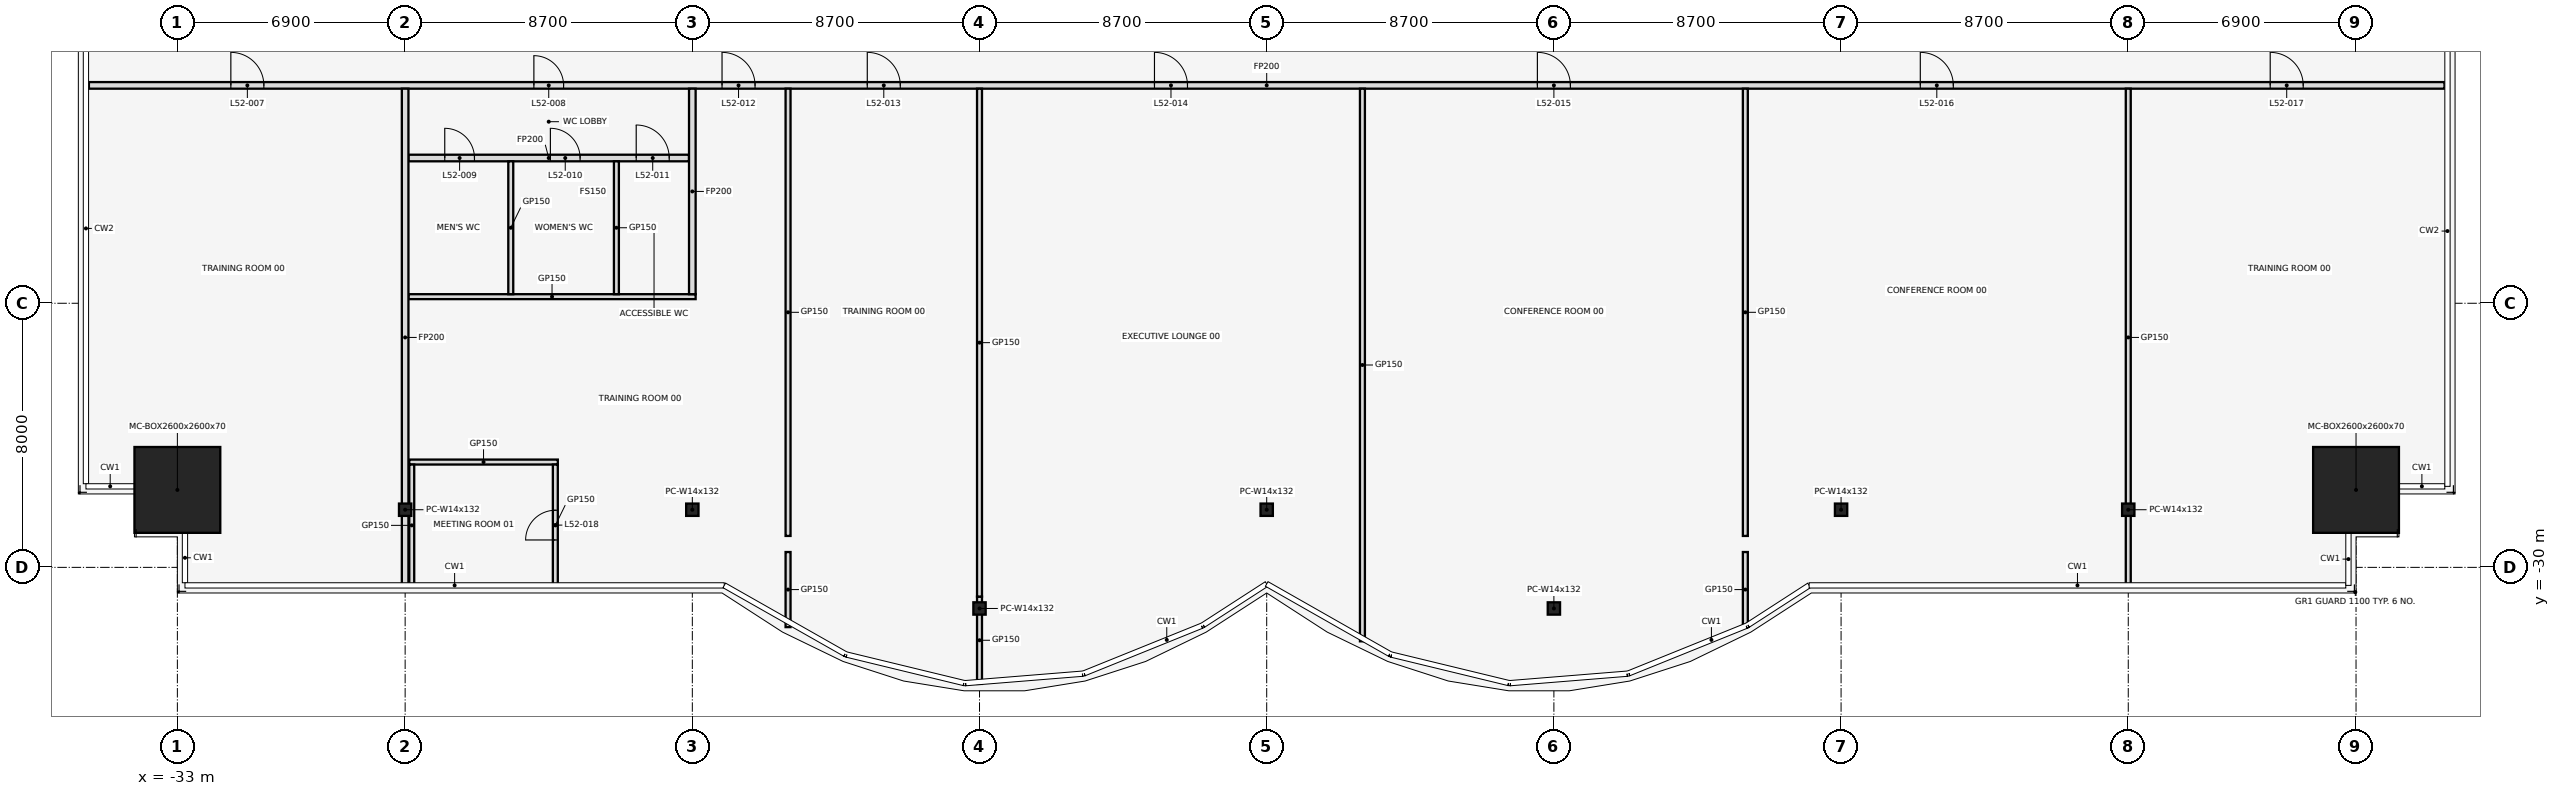
"""IFC4 building model, lengths in metres.
Left out: names, types, materials, properties, quantities, classifications, styles, units other than length and angle.
Written with IfcOpenShell. Run it as: python <this file> out.ifc"""

import sys

from ifc_helpers import new_model, si_unit, direction, frame, frame_2d, origin, origin_2d, place, context, subcontext, project, spatial, rectangle, hollow_rectangle, i_section, extrude, element, fill, save


model = new_model("IFC4")
c1 = context("Model", 3, precision=1e-05, world=origin(), true_north=direction((0.0, 1.0)))
c2 = subcontext(c1, "Body", "Model", "MODEL_VIEW")
j1 = project(units=[si_unit("LENGTHUNIT", "METRE"), si_unit("PLANEANGLEUNIT", "RADIAN")], contexts=[c1])
p1 = place(None, origin())
s1 = spatial("IfcSite", under=j1, at=p1, CompositionType="ELEMENT")
p2 = place(p1, origin())
s2 = spatial("IfcBuilding", under=s1, at=p2, CompositionType="ELEMENT")
p3 = place(p2, frame((0.0, 0.0, 231.9)))
s3 = spatial("IfcBuildingStorey", under=s2, at=p3, CompositionType="ELEMENT", Elevation=231.9)
p4 = place(p3, frame((-33.0, -27.654, 0.0), z_axis=(0.0, 0.0, 1.0), x_axis=(1.0, 0.0, 0.0)))
e1 = element("IfcColumn", 1, at=p4, inside=s3, PredefinedType="COLUMN", context=c2, shape_type="SweptSolid", body=[
    extrude(hollow_rectangle(XDim=2.6, YDim=2.6, WallThickness=0.07, at=origin_2d()), origin(), (0.0, 0.0, 1.0), 4.1),
])
for number, where, z_axis, x_axis in (
    (2, (-26.1, -28.254, 0.0), (0.0, 0.0, 1.0), (1.0, 0.0, 0.0)),
    (3, (-17.4, -28.254, 0.0), (0.0, 0.0, 1.0), (1.0, 0.0, 0.0)),
    (4, (-8.7, -31.245, 0.0), (0.0, 0.0, 1.0), (1.0, 0.0, 0.0)),
    (5, (0.0, -28.254, 0.0), (0.0, 0.0, 1.0), (1.0, 0.0, 0.0)),
    (6, (8.7, -31.245, 0.0), (0.0, 0.0, 1.0), (1.0, 0.0, 0.0)),
    (7, (17.4, -28.254, 0.0), (0.0, 0.0, 1.0), (1.0, 0.0, 0.0)),
    (8, (26.1, -28.254, 0.0), (0.0, 0.0, 1.0), (1.0, 0.0, 0.0)),
):
    element("IfcColumn", number, at=place(p3, frame(where, z_axis=z_axis, x_axis=x_axis)), inside=s3, PredefinedType="COLUMN", context=c2, shape_type="SweptSolid", body=[
        extrude(i_section(OverallWidth=0.373, OverallDepth=0.373, WebThickness=0.016, FlangeThickness=0.026, at=origin_2d()), origin(), (0.0, 0.0, 1.0), 4.1),
    ])
p5 = place(p3, frame((33.0, -27.654, 0.0), z_axis=(0.0, 0.0, 1.0), x_axis=(1.0, 0.0, 0.0)))
e9 = element("IfcColumn", 9, at=p5, inside=s3, PredefinedType="COLUMN", context=c2, shape_type="SweptSolid", body=[
    extrude(hollow_rectangle(XDim=2.6, YDim=2.6, WallThickness=0.07, at=origin_2d()), origin(), (0.0, 0.0, 1.0), 4.1),
])
p6 = place(p3, frame((-25.975, -26.81, 0.0), z_axis=(0.0, 0.0, 1.0), x_axis=(1.0, 0.0, 0.0)))
e10 = element("IfcWall", 10, at=p6, inside=s3, PredefinedType="PARTITIONING", context=c2, shape_type="SweptSolid", body=[
    extrude(rectangle(XDim=4.5, YDim=0.15, at=frame_2d((2.25, 0.0))), origin(), (0.0, 0.0, 1.0), 2.79),
])
p7 = place(p3, frame((-26.0, -21.8, 0.0), z_axis=(0.0, 0.0, 1.0), x_axis=(1.0, 0.0, 0.0)))
e11 = element("IfcWall", 11, at=p7, inside=s3, PredefinedType="PARTITIONING", context=c2, shape_type="SweptSolid", body=[
    extrude(rectangle(XDim=8.7, YDim=0.15, at=frame_2d((4.35, 0.0))), origin(), (0.0, 0.0, 1.0), 2.79),
])
p8 = place(p3, frame((-26.0, -17.6, 0.0), z_axis=(0.0, 0.0, 1.0), x_axis=(1.0, 0.0, 0.0)))
e12 = element("IfcWall", 12, at=p8, inside=s3, PredefinedType="PARTITIONING", context=c2, shape_type="SweptSolid", body=[
    extrude(rectangle(XDim=8.5, YDim=0.2, at=frame_2d((4.25, 0.0))), origin(), (0.0, 0.0, 1.0), 2.79),
])
p9 = place(p8, frame((1.1, 0.0, 0.0)))
e13 = element("IfcOpeningElement", 13, at=p9, cuts=e12, PredefinedType="OPENING", context=c2, shape_type="SweptSolid", body=[
    extrude(rectangle(XDim=0.9, YDim=2.1, at=frame_2d((0.45, 1.05))), frame((0.0, 0.112, 0.0), z_axis=(0.0, -1.0, 0.0), x_axis=(1.0, 0.0, 0.0)), (0.0, 0.0, 1.0), 0.224),
])
p10 = place(p8, frame((4.3, 0.0, 0.0)))
e14 = element("IfcOpeningElement", 14, at=p10, cuts=e12, PredefinedType="OPENING", context=c2, shape_type="SweptSolid", body=[
    extrude(rectangle(XDim=0.9, YDim=2.1, at=frame_2d((0.45, 1.05))), frame((0.0, 0.112, 0.0), z_axis=(0.0, -1.0, 0.0), x_axis=(1.0, 0.0, 0.0)), (0.0, 0.0, 1.0), 0.224),
])
p11 = place(p8, frame((6.9, 0.0, 0.0)))
e15 = element("IfcOpeningElement", 15, at=p11, cuts=e12, PredefinedType="OPENING", context=c2, shape_type="SweptSolid", body=[
    extrude(rectangle(XDim=1.0, YDim=2.1, at=frame_2d((0.5, 1.05))), frame((0.0, 0.112, 0.0), z_axis=(0.0, -1.0, 0.0), x_axis=(1.0, 0.0, 0.0)), (0.0, 0.0, 1.0), 0.224),
])
p12 = place(p3, frame((-35.68, -15.4, 0.0), z_axis=(0.0, 0.0, 1.0), x_axis=(1.0, 0.0, 0.0)))
e16 = element("IfcWall", 16, at=p12, inside=s3, PredefinedType="PARTITIONING", context=c2, shape_type="SweptSolid", body=[
    extrude(rectangle(XDim=71.36, YDim=0.2, at=frame_2d((35.68, 0.0))), origin(), (0.0, 0.0, 1.0), 2.79),
])
p13 = place(p12, frame((4.3, 0.0, 0.0)))
e17 = element("IfcOpeningElement", 17, at=p13, cuts=e16, PredefinedType="OPENING", context=c2, shape_type="SweptSolid", body=[
    extrude(rectangle(XDim=1.0, YDim=2.1, at=frame_2d((0.5, 1.05))), frame((0.0, 0.112, 0.0), z_axis=(0.0, -1.0, 0.0), x_axis=(1.0, 0.0, 0.0)), (0.0, 0.0, 1.0), 0.224),
])
p14 = place(p12, frame((13.48, 0.0, 0.0)))
e18 = element("IfcOpeningElement", 18, at=p14, cuts=e16, PredefinedType="OPENING", context=c2, shape_type="SweptSolid", body=[
    extrude(rectangle(XDim=0.9, YDim=2.1, at=frame_2d((0.45, 1.05))), frame((0.0, 0.112, 0.0), z_axis=(0.0, -1.0, 0.0), x_axis=(1.0, 0.0, 0.0)), (0.0, 0.0, 1.0), 0.224),
])
p15 = place(p12, frame((19.18, 0.0, 0.0)))
e19 = element("IfcOpeningElement", 19, at=p15, cuts=e16, PredefinedType="OPENING", context=c2, shape_type="SweptSolid", body=[
    extrude(rectangle(XDim=1.0, YDim=2.1, at=frame_2d((0.5, 1.05))), frame((0.0, 0.112, 0.0), z_axis=(0.0, -1.0, 0.0), x_axis=(1.0, 0.0, 0.0)), (0.0, 0.0, 1.0), 0.224),
])
p16 = place(p12, frame((23.58, 0.0, 0.0)))
e20 = element("IfcOpeningElement", 20, at=p16, cuts=e16, PredefinedType="OPENING", context=c2, shape_type="SweptSolid", body=[
    extrude(rectangle(XDim=1.0, YDim=2.1, at=frame_2d((0.5, 1.05))), frame((0.0, 0.112, 0.0), z_axis=(0.0, -1.0, 0.0), x_axis=(1.0, 0.0, 0.0)), (0.0, 0.0, 1.0), 0.224),
])
p17 = place(p12, frame((32.28, 0.0, 0.0)))
e21 = element("IfcOpeningElement", 21, at=p17, cuts=e16, PredefinedType="OPENING", context=c2, shape_type="SweptSolid", body=[
    extrude(rectangle(XDim=1.0, YDim=2.1, at=frame_2d((0.5, 1.05))), frame((0.0, 0.112, 0.0), z_axis=(0.0, -1.0, 0.0), x_axis=(1.0, 0.0, 0.0)), (0.0, 0.0, 1.0), 0.224),
])
p18 = place(p12, frame((43.88, 0.0, 0.0)))
e22 = element("IfcOpeningElement", 22, at=p18, cuts=e16, PredefinedType="OPENING", context=c2, shape_type="SweptSolid", body=[
    extrude(rectangle(XDim=1.0, YDim=2.1, at=frame_2d((0.5, 1.05))), frame((0.0, 0.112, 0.0), z_axis=(0.0, -1.0, 0.0), x_axis=(1.0, 0.0, 0.0)), (0.0, 0.0, 1.0), 0.224),
])
p19 = place(p12, frame((55.48, 0.0, 0.0)))
e23 = element("IfcOpeningElement", 23, at=p19, cuts=e16, PredefinedType="OPENING", context=c2, shape_type="SweptSolid", body=[
    extrude(rectangle(XDim=1.0, YDim=2.1, at=frame_2d((0.5, 1.05))), frame((0.0, 0.112, 0.0), z_axis=(0.0, -1.0, 0.0), x_axis=(1.0, 0.0, 0.0)), (0.0, 0.0, 1.0), 0.224),
])
p20 = place(p12, frame((66.08, 0.0, 0.0)))
e24 = element("IfcOpeningElement", 24, at=p20, cuts=e16, PredefinedType="OPENING", context=c2, shape_type="SweptSolid", body=[
    extrude(rectangle(XDim=1.0, YDim=2.1, at=frame_2d((0.5, 1.05))), frame((0.0, 0.112, 0.0), z_axis=(0.0, -1.0, 0.0), x_axis=(1.0, 0.0, 0.0)), (0.0, 0.0, 1.0), 0.224),
])
p21 = place(p3, frame((-26.1, -30.57, 0.0), z_axis=(0.0, 0.0, 1.0), x_axis=(0.0, 1.0, 0.0)))
e25 = element("IfcWall", 25, at=p21, inside=s3, PredefinedType="PARTITIONING", context=c2, shape_type="SweptSolid", body=[
    extrude(rectangle(XDim=15.07, YDim=0.2, at=frame_2d((7.535, 0.0))), origin(), (0.0, 0.0, 1.0), 2.79),
])
p22 = place(p3, frame((-25.9, -30.57, 0.0), z_axis=(0.0, 0.0, 1.0), x_axis=(0.0, 1.0, 0.0)))
e26 = element("IfcWall", 26, at=p22, inside=s3, PredefinedType="PARTITIONING", context=c2, shape_type="SweptSolid", body=[
    extrude(rectangle(XDim=3.685, YDim=0.15, at=frame_2d((1.843, 0.0))), origin(), (0.0, 0.0, 1.0), 2.79),
])
p23 = place(p3, frame((-22.9, -21.725, 0.0), z_axis=(0.0, 0.0, 1.0), x_axis=(0.0, 1.0, 0.0)))
e27 = element("IfcWall", 27, at=p23, inside=s3, PredefinedType="PARTITIONING", context=c2, shape_type="SweptSolid", body=[
    extrude(rectangle(XDim=4.025, YDim=0.15, at=frame_2d((2.013, 0.0))), origin(), (0.0, 0.0, 1.0), 2.79),
])
p24 = place(p3, frame((-21.55, -30.57, 0.0), z_axis=(0.0, 0.0, 1.0), x_axis=(0.0, 1.0, 0.0)))
e28 = element("IfcWall", 28, at=p24, inside=s3, PredefinedType="PARTITIONING", context=c2, shape_type="SweptSolid", body=[
    extrude(rectangle(XDim=3.685, YDim=0.15, at=frame_2d((1.843, 0.0))), origin(), (0.0, 0.0, 1.0), 2.79),
])
p25 = place(p24, frame((1.4, 0.0, 0.0)))
e29 = element("IfcOpeningElement", 29, at=p25, cuts=e28, PredefinedType="OPENING", context=c2, shape_type="SweptSolid", body=[
    extrude(rectangle(XDim=0.9, YDim=2.1, at=frame_2d((0.45, 1.05))), frame((0.0, 0.087, 0.0), z_axis=(0.0, -1.0, 0.0), x_axis=(1.0, 0.0, 0.0)), (0.0, 0.0, 1.0), 0.174),
])
p26 = place(p3, frame((-19.7, -21.725, 0.0), z_axis=(0.0, 0.0, 1.0), x_axis=(0.0, 1.0, 0.0)))
e30 = element("IfcWall", 30, at=p26, inside=s3, PredefinedType="PARTITIONING", context=c2, shape_type="SweptSolid", body=[
    extrude(rectangle(XDim=4.025, YDim=0.15, at=frame_2d((2.013, 0.0))), origin(), (0.0, 0.0, 1.0), 2.79),
])
p27 = place(p3, frame((-17.4, -21.725, 0.0), z_axis=(0.0, 0.0, 1.0), x_axis=(0.0, 1.0, 0.0)))
e31 = element("IfcWall", 31, at=p27, inside=s3, PredefinedType="PARTITIONING", context=c2, shape_type="SweptSolid", body=[
    extrude(rectangle(XDim=6.225, YDim=0.2, at=frame_2d((3.113, 0.0))), origin(), (0.0, 0.0, 1.0), 2.79),
])
p28 = place(p3, frame((-14.5, -31.81, 0.0), z_axis=(0.0, 0.0, 1.0), x_axis=(0.0, 1.0, 0.0)))
e32 = element("IfcWall", 32, at=p28, inside=s3, PredefinedType="PARTITIONING", context=c2, shape_type="SweptSolid", body=[
    extrude(rectangle(XDim=2.275, YDim=0.15, at=frame_2d((1.137, 0.0))), origin(), (0.0, 0.0, 1.0), 2.79),
])
p29 = place(p3, frame((-14.5, -29.048, 0.0), z_axis=(0.0, 0.0, 1.0), x_axis=(0.0, 1.0, 0.0)))
e33 = element("IfcWall", 33, at=p29, inside=s3, PredefinedType="PARTITIONING", context=c2, shape_type="SweptSolid", body=[
    extrude(rectangle(XDim=13.548, YDim=0.15, at=frame_2d((6.774, 0.0))), origin(), (0.0, 0.0, 1.0), 2.79),
])
p30 = place(p3, frame((-8.7, -33.53, 0.0), z_axis=(0.0, 0.0, 1.0), x_axis=(0.0, 1.0, 0.0)))
e34 = element("IfcWall", 34, at=p30, inside=s3, PredefinedType="PARTITIONING", context=c2, shape_type="SweptSolid", body=[
    extrude(rectangle(XDim=2.644, YDim=0.15, at=frame_2d((1.322, 0.0))), origin(), (0.0, 0.0, 1.0), 2.79),
])
p31 = place(p3, frame((-8.7, -30.886, 0.0), z_axis=(0.0, 0.0, 1.0), x_axis=(0.0, 1.0, 0.0)))
e35 = element("IfcWall", 35, at=p31, inside=s3, PredefinedType="PARTITIONING", context=c2, shape_type="SweptSolid", body=[
    extrude(rectangle(XDim=15.386, YDim=0.15, at=frame_2d((7.693, 0.0))), origin(), (0.0, 0.0, 1.0), 2.79),
])
p32 = place(p3, frame((2.9, -32.24, 0.0), z_axis=(0.0, 0.0, 1.0), x_axis=(0.0, 1.0, 0.0)))
e36 = element("IfcWall", 36, at=p32, inside=s3, PredefinedType="PARTITIONING", context=c2, shape_type="SweptSolid", body=[
    extrude(rectangle(XDim=16.74, YDim=0.15, at=frame_2d((8.37, 0.0))), origin(), (0.0, 0.0, 1.0), 2.79),
])
p33 = place(p3, frame((14.5, -31.81, 0.0), z_axis=(0.0, 0.0, 1.0), x_axis=(0.0, 1.0, 0.0)))
e37 = element("IfcWall", 37, at=p33, inside=s3, PredefinedType="PARTITIONING", context=c2, shape_type="SweptSolid", body=[
    extrude(rectangle(XDim=2.275, YDim=0.15, at=frame_2d((1.137, 0.0))), origin(), (0.0, 0.0, 1.0), 2.79),
])
p34 = place(p3, frame((14.5, -29.048, 0.0), z_axis=(0.0, 0.0, 1.0), x_axis=(0.0, 1.0, 0.0)))
e38 = element("IfcWall", 38, at=p34, inside=s3, PredefinedType="PARTITIONING", context=c2, shape_type="SweptSolid", body=[
    extrude(rectangle(XDim=13.548, YDim=0.15, at=frame_2d((6.774, 0.0))), origin(), (0.0, 0.0, 1.0), 2.79),
])
p35 = place(p3, frame((26.1, -30.57, 0.0), z_axis=(0.0, 0.0, 1.0), x_axis=(0.0, 1.0, 0.0)))
e39 = element("IfcWall", 39, at=p35, inside=s3, PredefinedType="PARTITIONING", context=c2, shape_type="SweptSolid", body=[
    extrude(rectangle(XDim=15.07, YDim=0.15, at=frame_2d((7.535, 0.0))), origin(), (0.0, 0.0, 1.0), 2.79),
])
p36 = place(p13, frame((1.0, 0.0, 0.0), z_axis=(0.0, 0.0, 1.0), x_axis=(-1.0, 0.0, 0.0)))
e40 = element("IfcDoor", 40, at=p36, inside=s3, OperationType="SINGLE_SWING_LEFT", PredefinedType="DOOR", context=c2, shape_type="SweptSolid", body=[
    extrude(rectangle(XDim=1.0, YDim=2.1, at=frame_2d((0.5, 1.05))), frame((0.0, 0.025, 0.0), z_axis=(0.0, -1.0, 0.0), x_axis=(1.0, 0.0, 0.0)), (0.0, 0.0, 1.0), 0.05),
])
fill(e17, e40)
p37 = place(p14, frame((0.9, 0.0, 0.0), z_axis=(0.0, 0.0, 1.0), x_axis=(-1.0, 0.0, 0.0)))
e41 = element("IfcDoor", 41, at=p37, inside=s3, OperationType="SINGLE_SWING_RIGHT", PredefinedType="DOOR", context=c2, shape_type="SweptSolid", body=[
    extrude(rectangle(XDim=0.9, YDim=2.1, at=frame_2d((0.45, 1.05))), frame((0.0, 0.025, 0.0), z_axis=(0.0, -1.0, 0.0), x_axis=(1.0, 0.0, 0.0)), (0.0, 0.0, 1.0), 0.05),
])
fill(e18, e41)
p38 = place(p9, frame((0.9, 0.0, 0.0), z_axis=(0.0, 0.0, 1.0), x_axis=(-1.0, 0.0, 0.0)))
e42 = element("IfcDoor", 42, at=p38, inside=s3, OperationType="SINGLE_SWING_RIGHT", PredefinedType="DOOR", context=c2, shape_type="SweptSolid", body=[
    extrude(rectangle(XDim=0.9, YDim=2.1, at=frame_2d((0.45, 1.05))), frame((0.0, 0.025, 0.0), z_axis=(0.0, -1.0, 0.0), x_axis=(1.0, 0.0, 0.0)), (0.0, 0.0, 1.0), 0.05),
])
fill(e13, e42)
p39 = place(p10, frame((0.9, 0.0, 0.0), z_axis=(0.0, 0.0, 1.0), x_axis=(-1.0, 0.0, 0.0)))
e43 = element("IfcDoor", 43, at=p39, inside=s3, OperationType="SINGLE_SWING_LEFT", PredefinedType="DOOR", context=c2, shape_type="SweptSolid", body=[
    extrude(rectangle(XDim=0.9, YDim=2.1, at=frame_2d((0.45, 1.05))), frame((0.0, 0.025, 0.0), z_axis=(0.0, -1.0, 0.0), x_axis=(1.0, 0.0, 0.0)), (0.0, 0.0, 1.0), 0.05),
])
fill(e14, e43)
p40 = place(p11, frame((1.0, 0.0, 0.0), z_axis=(0.0, 0.0, 1.0), x_axis=(-1.0, 0.0, 0.0)))
e44 = element("IfcDoor", 44, at=p40, inside=s3, OperationType="SINGLE_SWING_RIGHT", PredefinedType="DOOR", context=c2, shape_type="SweptSolid", body=[
    extrude(rectangle(XDim=1.0, YDim=2.1, at=frame_2d((0.5, 1.05))), frame((0.0, 0.025, 0.0), z_axis=(0.0, -1.0, 0.0), x_axis=(1.0, 0.0, 0.0)), (0.0, 0.0, 1.0), 0.05),
])
fill(e15, e44)
p41 = place(p15, frame((1.0, 0.0, 0.0), z_axis=(0.0, 0.0, 1.0), x_axis=(-1.0, 0.0, 0.0)))
e45 = element("IfcDoor", 45, at=p41, inside=s3, OperationType="SINGLE_SWING_RIGHT", PredefinedType="DOOR", context=c2, shape_type="SweptSolid", body=[
    extrude(rectangle(XDim=1.0, YDim=2.1, at=frame_2d((0.5, 1.05))), frame((0.0, 0.025, 0.0), z_axis=(0.0, -1.0, 0.0), x_axis=(1.0, 0.0, 0.0)), (0.0, 0.0, 1.0), 0.05),
])
fill(e19, e45)
p42 = place(p16, frame((1.0, 0.0, 0.0), z_axis=(0.0, 0.0, 1.0), x_axis=(-1.0, 0.0, 0.0)))
e46 = element("IfcDoor", 46, at=p42, inside=s3, OperationType="SINGLE_SWING_LEFT", PredefinedType="DOOR", context=c2, shape_type="SweptSolid", body=[
    extrude(rectangle(XDim=1.0, YDim=2.1, at=frame_2d((0.5, 1.05))), frame((0.0, 0.025, 0.0), z_axis=(0.0, -1.0, 0.0), x_axis=(1.0, 0.0, 0.0)), (0.0, 0.0, 1.0), 0.05),
])
fill(e20, e46)
p43 = place(p17, frame((1.0, 0.0, 0.0), z_axis=(0.0, 0.0, 1.0), x_axis=(-1.0, 0.0, 0.0)))
e47 = element("IfcDoor", 47, at=p43, inside=s3, OperationType="SINGLE_SWING_RIGHT", PredefinedType="DOOR", context=c2, shape_type="SweptSolid", body=[
    extrude(rectangle(XDim=1.0, YDim=2.1, at=frame_2d((0.5, 1.05))), frame((0.0, 0.025, 0.0), z_axis=(0.0, -1.0, 0.0), x_axis=(1.0, 0.0, 0.0)), (0.0, 0.0, 1.0), 0.05),
])
fill(e21, e47)
p44 = place(p18, frame((1.0, 0.0, 0.0), z_axis=(0.0, 0.0, 1.0), x_axis=(-1.0, 0.0, 0.0)))
e48 = element("IfcDoor", 48, at=p44, inside=s3, OperationType="SINGLE_SWING_RIGHT", PredefinedType="DOOR", context=c2, shape_type="SweptSolid", body=[
    extrude(rectangle(XDim=1.0, YDim=2.1, at=frame_2d((0.5, 1.05))), frame((0.0, 0.025, 0.0), z_axis=(0.0, -1.0, 0.0), x_axis=(1.0, 0.0, 0.0)), (0.0, 0.0, 1.0), 0.05),
])
fill(e22, e48)
p45 = place(p19, frame((1.0, 0.0, 0.0), z_axis=(0.0, 0.0, 1.0), x_axis=(-1.0, 0.0, 0.0)))
e49 = element("IfcDoor", 49, at=p45, inside=s3, OperationType="SINGLE_SWING_LEFT", PredefinedType="DOOR", context=c2, shape_type="SweptSolid", body=[
    extrude(rectangle(XDim=1.0, YDim=2.1, at=frame_2d((0.5, 1.05))), frame((0.0, 0.025, 0.0), z_axis=(0.0, -1.0, 0.0), x_axis=(1.0, 0.0, 0.0)), (0.0, 0.0, 1.0), 0.05),
])
fill(e23, e49)
p46 = place(p20, frame((1.0, 0.0, 0.0), z_axis=(0.0, 0.0, 1.0), x_axis=(-1.0, 0.0, 0.0)))
e50 = element("IfcDoor", 50, at=p46, inside=s3, OperationType="SINGLE_SWING_RIGHT", PredefinedType="DOOR", context=c2, shape_type="SweptSolid", body=[
    extrude(rectangle(XDim=1.0, YDim=2.1, at=frame_2d((0.5, 1.05))), frame((0.0, 0.025, 0.0), z_axis=(0.0, -1.0, 0.0), x_axis=(1.0, 0.0, 0.0)), (0.0, 0.0, 1.0), 0.05),
])
fill(e24, e50)
p47 = place(p25, origin())
e51 = element("IfcDoor", 51, at=p47, inside=s3, OperationType="SINGLE_SWING_RIGHT", PredefinedType="DOOR", context=c2, shape_type="SweptSolid", body=[
    extrude(rectangle(XDim=0.9, YDim=2.1, at=frame_2d((0.45, 1.05))), frame((0.0, 0.025, 0.0), z_axis=(0.0, -1.0, 0.0), x_axis=(1.0, 0.0, 0.0)), (0.0, 0.0, 1.0), 0.05),
])
fill(e29, e51)
save(model, sys.argv[1])
